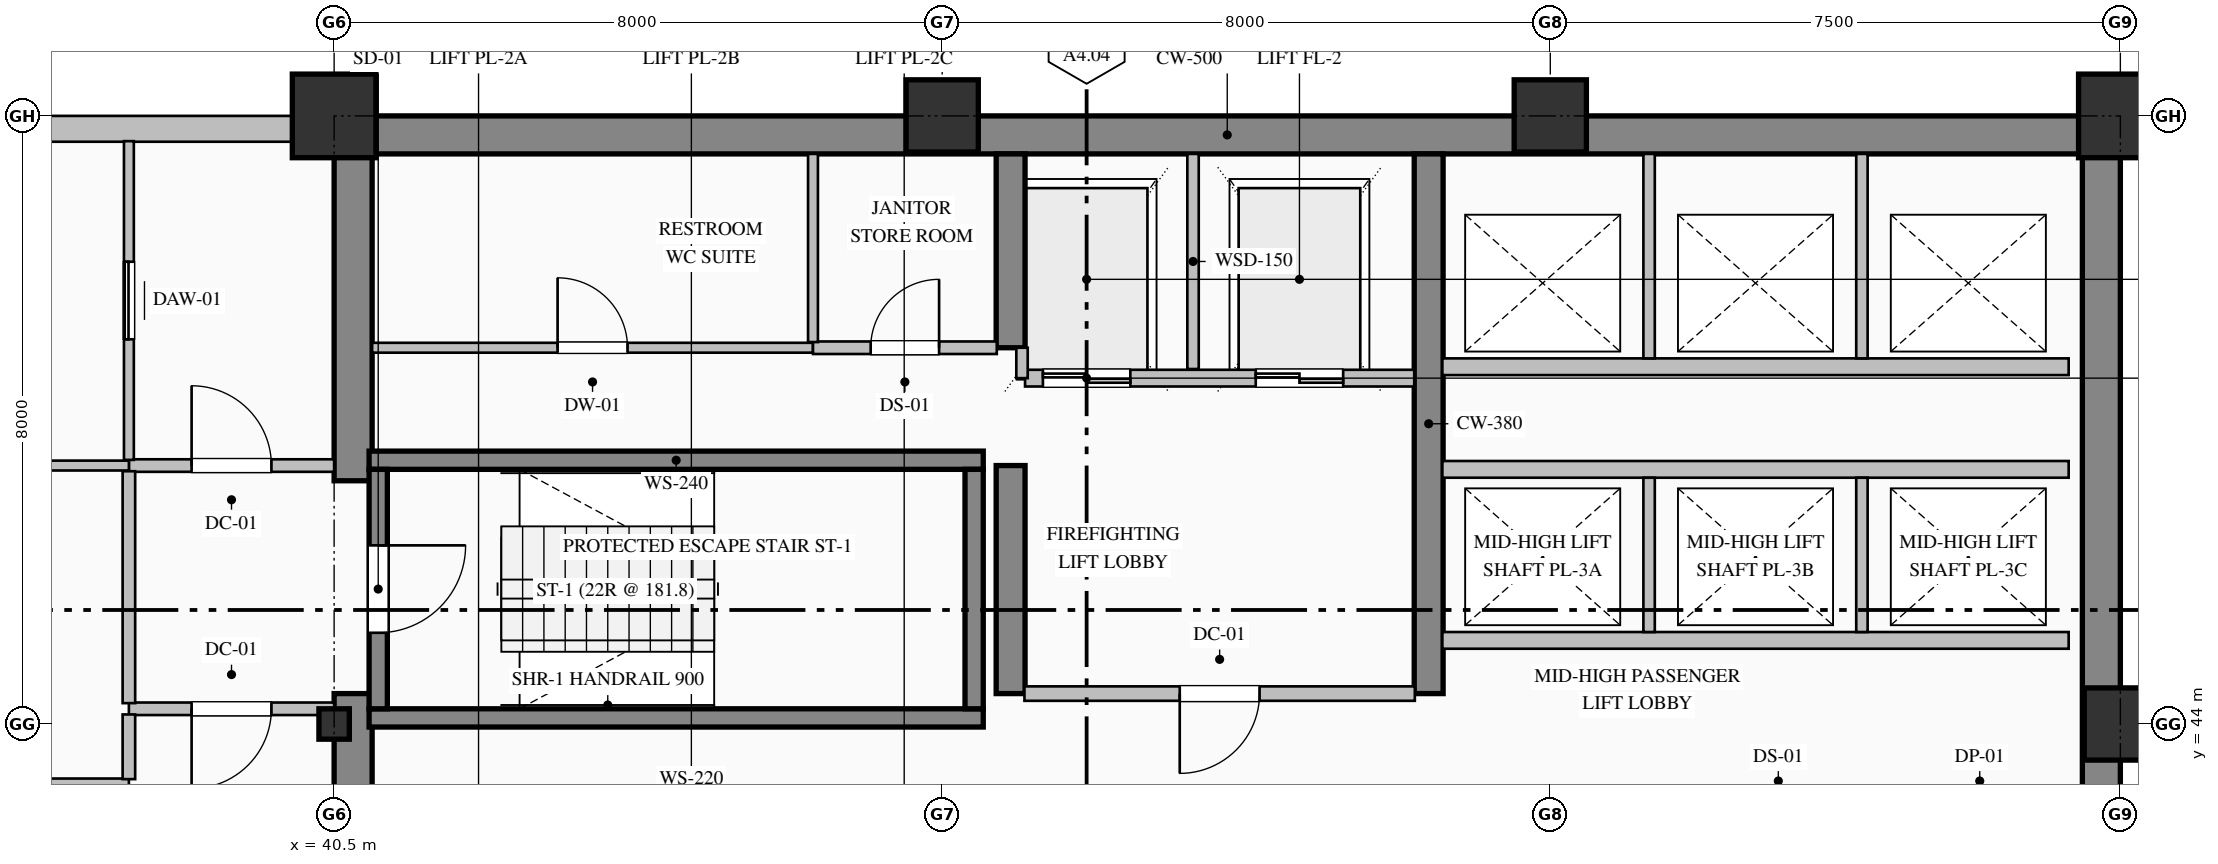
"""IFC4 building model, lengths in metres.
Left out: names, types, materials, properties, quantities, classifications, styles, units other than length and angle.
Written with IfcOpenShell. Run it as: python <this file> out.ifc"""

import sys

from ifc_helpers import new_model, si_unit, direction, frame, frame_2d, origin, origin_2d, place, context, subcontext, project, spatial, rectangle, hollow_rectangle, i_section, extrude, element, fill, save


model = new_model("IFC4")
c1 = context("Model", 3, precision=1e-05, world=origin(), true_north=direction((0.0, 1.0)))
c2 = subcontext(c1, "Body", "Model", "MODEL_VIEW")
j1 = project(units=[si_unit("LENGTHUNIT", "METRE"), si_unit("PLANEANGLEUNIT", "RADIAN")], contexts=[c1])
p1 = place(None, origin())
s1 = spatial("IfcSite", under=j1, at=p1, CompositionType="ELEMENT")
p2 = place(p1, origin())
s2 = spatial("IfcBuilding", under=s1, at=p2, CompositionType="ELEMENT")
p3 = place(p2, frame((0.0, 0.0, 191.0)))
s3 = spatial("IfcBuildingStorey", under=s2, at=p3, CompositionType="ELEMENT", Elevation=191.0)
p4 = place(p3, frame((40.5, 51.75, 0.0), z_axis=(0.0, 0.0, 1.0), x_axis=(1.0, 0.0, 0.0)))
e1 = element("IfcWall", 1, at=p4, inside=s3, PredefinedType="SHEAR", context=c2, shape_type="SweptSolid", body=[
    extrude(rectangle(XDim=23.5, YDim=0.5, at=frame_2d((11.75, 0.0))), origin(), (0.0, 0.0, 1.0), 3.65),
])
p5 = place(p3, frame((63.75, 36.32, 0.0), z_axis=(0.0, 0.0, 1.0), x_axis=(0.0, 1.0, 0.0)))
e2 = element("IfcWall", 2, at=p5, inside=s3, PredefinedType="SHEAR", context=c2, shape_type="SweptSolid", body=[
    extrude(rectangle(XDim=15.18, YDim=0.5, at=frame_2d((7.59, 0.0))), origin(), (0.0, 0.0, 1.0), 3.65),
])
p6 = place(p3, frame((40.75, 36.5, 0.0), z_axis=(0.0, 0.0, 1.0), x_axis=(0.0, 1.0, 0.0)))
e3 = element("IfcWall", 3, at=p6, inside=s3, PredefinedType="SHEAR", context=c2, shape_type="SweptSolid", body=[
    extrude(rectangle(XDim=7.9, YDim=0.5, at=frame_2d((3.95, 0.0))), origin(), (0.0, 0.0, 1.0), 3.65),
])
p7 = place(p3, frame((40.75, 47.2, 0.0), z_axis=(0.0, 0.0, 1.0), x_axis=(0.0, 1.0, 0.0)))
e4 = element("IfcWall", 4, at=p7, inside=s3, PredefinedType="SHEAR", context=c2, shape_type="SweptSolid", body=[
    extrude(rectangle(XDim=4.3, YDim=0.5, at=frame_2d((2.15, 0.0))), origin(), (0.0, 0.0, 1.0), 3.65),
])
p8 = place(p3, frame((49.4, 44.4, 0.0), z_axis=(0.0, 0.0, 1.0), x_axis=(0.0, 1.0, 0.0)))
e5 = element("IfcWall", 5, at=p8, inside=s3, PredefinedType="SHEAR", context=c2, shape_type="SweptSolid", body=[
    extrude(rectangle(XDim=3.0, YDim=0.38, at=frame_2d((1.5, 0.0))), origin(), (0.0, 0.0, 1.0), 3.65),
])
p9 = place(p3, frame((49.4, 48.95, 0.0), z_axis=(0.0, 0.0, 1.0), x_axis=(0.0, 1.0, 0.0)))
e6 = element("IfcWall", 6, at=p9, inside=s3, PredefinedType="SHEAR", context=c2, shape_type="SweptSolid", body=[
    extrude(rectangle(XDim=2.55, YDim=0.38, at=frame_2d((1.275, 0.0))), origin(), (0.0, 0.0, 1.0), 3.65),
])
p10 = place(p3, frame((54.9, 44.4, 0.0), z_axis=(0.0, 0.0, 1.0), x_axis=(0.0, 1.0, 0.0)))
e7 = element("IfcWall", 7, at=p10, inside=s3, PredefinedType="SHEAR", context=c2, shape_type="SweptSolid", body=[
    extrude(rectangle(XDim=7.1, YDim=0.38, at=frame_2d((3.55, 0.0))), origin(), (0.0, 0.0, 1.0), 3.65),
])
p11 = place(p3, frame((40.5, 44.0, 0.0), z_axis=(0.0, 0.0, 1.0), x_axis=(1.0, 0.0, 0.0)))
e8 = element("IfcColumn", 8, at=p11, inside=s3, PredefinedType="COLUMN", context=c2, shape_type="SweptSolid", body=[
    extrude(i_section(OverallWidth=0.4, OverallDepth=0.4, WebThickness=0.013, FlangeThickness=0.021, FilletRadius=0.022, at=origin_2d()), origin(), (0.0, 0.0, 1.0), 4.0),
])
p12 = place(p3, frame((40.5, 52.0, 0.0), z_axis=(0.0, 0.0, 1.0), x_axis=(1.0, 0.0, 0.0)))
e9 = element("IfcColumn", 9, at=p12, inside=s3, PredefinedType="COLUMN", context=c2, shape_type="SweptSolid", body=[
    extrude(hollow_rectangle(XDim=1.1, YDim=1.1, WallThickness=0.04, at=origin_2d()), origin(), (0.0, 0.0, 1.0), 4.0),
])
for number, where, z_axis, x_axis in (
    (10, (48.5, 52.0, 0.0), (0.0, 0.0, 1.0), (1.0, 0.0, 0.0)),
    (11, (56.5, 52.0, 0.0), (0.0, 0.0, 1.0), (1.0, 0.0, 0.0)),
    (12, (64.0, 44.0, 0.0), (0.0, 0.0, 1.0), (1.0, 0.0, 0.0)),
):
    element("IfcColumn", number, at=place(p3, frame(where, z_axis=z_axis, x_axis=x_axis)), inside=s3, PredefinedType="COLUMN", context=c2, shape_type="SweptSolid", body=[
        extrude(hollow_rectangle(XDim=0.95, YDim=0.95, WallThickness=0.036, at=origin_2d()), origin(), (0.0, 0.0, 1.0), 4.0),
    ])
p13 = place(p3, frame((64.0, 52.0, 0.0), z_axis=(0.0, 0.0, 1.0), x_axis=(1.0, 0.0, 0.0)))
e13 = element("IfcColumn", 13, at=p13, inside=s3, PredefinedType="COLUMN", context=c2, shape_type="SweptSolid", body=[
    extrude(hollow_rectangle(XDim=1.1, YDim=1.1, WallThickness=0.04, at=origin_2d()), origin(), (0.0, 0.0, 1.0), 4.0),
])
p14 = place(p3, frame((13.0, 51.83, 0.0), z_axis=(0.0, 0.0, 1.0), x_axis=(1.0, 0.0, 0.0)))
e14 = element("IfcWall", 14, at=p14, inside=s3, PredefinedType="SOLIDWALL", context=c2, shape_type="SweptSolid", body=[
    extrude(rectangle(XDim=27.52, YDim=0.34, at=frame_2d((13.76, 0.0))), origin(), (0.0, 0.0, 1.0), 3.15),
])
p15 = place(p14, frame((6.375, 0.0, 0.85)))
e15 = element("IfcOpeningElement", 15, at=p15, cuts=e14, PredefinedType="OPENING", context=c2, shape_type="SweptSolid", body=[
    extrude(rectangle(XDim=1.65, YDim=1.95, at=frame_2d((0.825, 0.975))), frame((0.0, 0.18, 0.0), z_axis=(0.0, -1.0, 0.0), x_axis=(1.0, 0.0, 0.0)), (0.0, 0.0, 1.0), 0.36),
])
p16 = place(p14, frame((13.65, 0.0, 0.85)))
e16 = element("IfcOpeningElement", 16, at=p16, cuts=e14, PredefinedType="OPENING", context=c2, shape_type="SweptSolid", body=[
    extrude(rectangle(XDim=1.5, YDim=1.95, at=frame_2d((0.75, 0.975))), frame((0.0, 0.18, 0.0), z_axis=(0.0, -1.0, 0.0), x_axis=(1.0, 0.0, 0.0)), (0.0, 0.0, 1.0), 0.36),
])
for number, where, z_axis, x_axis in (
    (17, (40.96, 47.47, 0.0), (0.0, 0.0, 1.0), (1.0, 0.0, 0.0)),
    (18, (49.04, 44.08, 0.0), (0.0, 0.0, 1.0), (-1.0, 0.0, 0.0)),
):
    element("IfcWall", number, at=place(p3, frame(where, z_axis=z_axis, x_axis=x_axis)), inside=s3, PredefinedType="SOLIDWALL", context=c2, shape_type="SweptSolid", body=[
        extrude(rectangle(XDim=8.08, YDim=0.24, at=frame_2d((4.04, 0.0))), origin(), (0.0, 0.0, 1.0), 4.0),
    ])
p17 = place(p3, frame((41.08, 47.35, 0.0), z_axis=(0.0, 0.0, 1.0), x_axis=(0.0, -1.0, 0.0)))
e19 = element("IfcWall", 19, at=p17, inside=s3, PredefinedType="SOLIDWALL", context=c2, shape_type="SweptSolid", body=[
    extrude(rectangle(XDim=3.15, YDim=0.24, at=frame_2d((1.575, 0.0))), origin(), (0.0, 0.0, 1.0), 4.0),
])
p18 = place(p17, frame((1.0, 0.0, 0.0)))
e20 = element("IfcOpeningElement", 20, at=p18, cuts=e19, PredefinedType="OPENING", context=c2, shape_type="SweptSolid", body=[
    extrude(rectangle(XDim=1.15, YDim=2.2, at=frame_2d((0.575, 1.1))), frame((0.0, 0.13, 0.0), z_axis=(0.0, -1.0, 0.0), x_axis=(1.0, 0.0, 0.0)), (0.0, 0.0, 1.0), 0.26),
])
p19 = place(p3, frame((48.92, 44.2, 0.0), z_axis=(0.0, 0.0, 1.0), x_axis=(0.0, 1.0, 0.0)))
e21 = element("IfcWall", 21, at=p19, inside=s3, PredefinedType="SOLIDWALL", context=c2, shape_type="SweptSolid", body=[
    extrude(rectangle(XDim=3.15, YDim=0.24, at=frame_2d((1.575, 0.0))), origin(), (0.0, 0.0, 1.0), 4.0),
])
p20 = place(p3, frame((54.71, 48.55, 0.0), z_axis=(0.0, 0.0, 1.0), x_axis=(-1.0, 0.0, 0.0)))
e22 = element("IfcWall", 22, at=p20, inside=s3, PredefinedType="PARTITIONING", context=c2, shape_type="SweptSolid", body=[
    extrude(rectangle(XDim=5.12, YDim=0.22, at=frame_2d((2.56, 0.0))), origin(), (0.0, 0.0, 1.0), 3.65),
])
p21 = place(p20, frame((3.735, 0.0, 0.0)))
e23 = element("IfcOpeningElement", 23, at=p21, cuts=e22, PredefinedType="OPENING", context=c2, shape_type="SweptSolid", body=[
    extrude(rectangle(XDim=1.15, YDim=2.2, at=frame_2d((0.575, 1.1))), frame((0.0, 0.12, 0.0), z_axis=(0.0, -1.0, 0.0), x_axis=(1.0, 0.0, 0.0)), (0.0, 0.0, 1.0), 0.24),
])
p22 = place(p20, frame((0.935, 0.0, 0.0)))
e24 = element("IfcOpeningElement", 24, at=p22, cuts=e22, PredefinedType="OPENING", context=c2, shape_type="SweptSolid", body=[
    extrude(rectangle(XDim=1.15, YDim=2.2, at=frame_2d((0.575, 1.1))), frame((0.0, 0.12, 0.0), z_axis=(0.0, -1.0, 0.0), x_axis=(1.0, 0.0, 0.0)), (0.0, 0.0, 1.0), 0.24),
])
p23 = place(p3, frame((51.8, 48.67, 0.0), z_axis=(0.0, 0.0, 1.0), x_axis=(0.0, 1.0, 0.0)))
e25 = element("IfcWall", 25, at=p23, inside=s3, PredefinedType="PARTITIONING", context=c2, shape_type="SweptSolid", body=[
    extrude(rectangle(XDim=2.83, YDim=0.15, at=frame_2d((1.415, 0.0))), origin(), (0.0, 0.0, 1.0), 3.65),
])
p24 = place(p3, frame((49.55, 48.55, 0.0), z_axis=(0.0, 0.0, 1.0), x_axis=(0.0, 1.0, 0.0)))
e26 = element("IfcWall", 26, at=p24, inside=s3, PredefinedType="PARTITIONING", context=c2, shape_type="SweptSolid", body=[
    extrude(rectangle(XDim=0.4, YDim=0.15, at=frame_2d((0.2, 0.0))), origin(), (0.0, 0.0, 1.0), 3.65),
])
for number, where, z_axis, x_axis in (
    (27, (63.32, 45.1, 0.0), (0.0, 0.0, 1.0), (-1.0, 0.0, 0.0)),
    (28, (55.08, 47.35, 0.0), (0.0, 0.0, 1.0), (1.0, 0.0, 0.0)),
):
    element("IfcWall", number, at=place(p3, frame(where, z_axis=z_axis, x_axis=x_axis)), inside=s3, PredefinedType="PARTITIONING", context=c2, shape_type="SweptSolid", body=[
        extrude(rectangle(XDim=8.24, YDim=0.22, at=frame_2d((4.12, 0.0))), origin(), (0.0, 0.0, 1.0), 3.65),
    ])
for number, where, z_axis, x_axis in (
    (29, (57.8, 45.21, 0.0), (0.0, 0.0, 1.0), (0.0, 1.0, 0.0)),
    (30, (60.6, 45.21, 0.0), (0.0, 0.0, 1.0), (0.0, 1.0, 0.0)),
):
    element("IfcWall", number, at=place(p3, frame(where, z_axis=z_axis, x_axis=x_axis)), inside=s3, PredefinedType="PARTITIONING", context=c2, shape_type="SweptSolid", body=[
        extrude(rectangle(XDim=2.03, YDim=0.15, at=frame_2d((1.015, 0.0))), origin(), (0.0, 0.0, 1.0), 3.65),
    ])
p25 = place(p3, frame((63.32, 48.7, 0.0), z_axis=(0.0, 0.0, 1.0), x_axis=(-1.0, 0.0, 0.0)))
e31 = element("IfcWall", 31, at=p25, inside=s3, PredefinedType="PARTITIONING", context=c2, shape_type="SweptSolid", body=[
    extrude(rectangle(XDim=8.24, YDim=0.22, at=frame_2d((4.12, 0.0))), origin(), (0.0, 0.0, 1.0), 3.65),
])
for number, where, z_axis, x_axis in (
    (32, (57.8, 48.81, 0.0), (0.0, 0.0, 1.0), (0.0, 1.0, 0.0)),
    (33, (60.6, 48.81, 0.0), (0.0, 0.0, 1.0), (0.0, 1.0, 0.0)),
):
    element("IfcWall", number, at=place(p3, frame(where, z_axis=z_axis, x_axis=x_axis)), inside=s3, PredefinedType="PARTITIONING", context=c2, shape_type="SweptSolid", body=[
        extrude(rectangle(XDim=2.69, YDim=0.15, at=frame_2d((1.345, 0.0))), origin(), (0.0, 0.0, 1.0), 3.65),
    ])
p26 = place(p3, frame((37.8, 47.4, 0.0), z_axis=(0.0, 0.0, 1.0), x_axis=(1.0, 0.0, 0.0)))
e34 = element("IfcWall", 34, at=p26, inside=s3, PredefinedType="PARTITIONING", context=c2, shape_type="SweptSolid", body=[
    extrude(rectangle(XDim=2.7, YDim=0.165, at=frame_2d((1.35, 0.0))), origin(), (0.0, 0.0, 1.0), 3.65),
])
p27 = place(p26, frame((0.825, 0.0, 0.0)))
e35 = element("IfcOpeningElement", 35, at=p27, cuts=e34, PredefinedType="OPENING", context=c2, shape_type="SweptSolid", body=[
    extrude(rectangle(XDim=1.05, YDim=2.15, at=frame_2d((0.525, 1.075))), frame((0.0, 0.093, 0.0), z_axis=(0.0, -1.0, 0.0), x_axis=(1.0, 0.0, 0.0)), (0.0, 0.0, 1.0), 0.185),
])
p28 = place(p3, frame((40.5, 44.2, 0.0), z_axis=(0.0, 0.0, 1.0), x_axis=(-1.0, 0.0, 0.0)))
e36 = element("IfcWall", 36, at=p28, inside=s3, PredefinedType="PARTITIONING", context=c2, shape_type="SweptSolid", body=[
    extrude(rectangle(XDim=2.7, YDim=0.165, at=frame_2d((1.35, 0.0))), origin(), (0.0, 0.0, 1.0), 3.65),
])
p29 = place(p28, frame((0.825, 0.0, 0.0)))
e37 = element("IfcOpeningElement", 37, at=p29, cuts=e36, PredefinedType="OPENING", context=c2, shape_type="SweptSolid", body=[
    extrude(rectangle(XDim=1.05, YDim=2.15, at=frame_2d((0.525, 1.075))), frame((0.0, 0.093, 0.0), z_axis=(0.0, -1.0, 0.0), x_axis=(1.0, 0.0, 0.0)), (0.0, 0.0, 1.0), 0.185),
])
p30 = place(p3, frame((37.8, 44.274, 0.0), z_axis=(0.0, 0.0, 1.0), x_axis=(0.0, 1.0, 0.0)))
e38 = element("IfcWall", 38, at=p30, inside=s3, PredefinedType="PARTITIONING", context=c2, shape_type="SweptSolid", body=[
    extrude(rectangle(XDim=3.051, YDim=0.165, at=frame_2d((1.525, 0.0))), origin(), (0.0, 0.0, 1.0), 3.65),
])
p31 = place(p3, frame((37.8, 47.475, 0.0), z_axis=(0.0, 0.0, 1.0), x_axis=(0.0, 1.0, 0.0)))
e39 = element("IfcWall", 39, at=p31, inside=s3, PredefinedType="PARTITIONING", context=c2, shape_type="SweptSolid", body=[
    extrude(rectangle(XDim=4.193, YDim=0.13, at=frame_2d((2.097, 0.0))), origin(), (0.0, 0.0, 1.0), 3.65),
])
p32 = place(p31, frame((1.587, 0.0, 0.0)))
e40 = element("IfcOpeningElement", 40, at=p32, cuts=e39, PredefinedType="OPENING", context=c2, shape_type="SweptSolid", body=[
    extrude(rectangle(XDim=1.02, YDim=2.15, at=frame_2d((0.51, 1.075))), frame((0.0, 0.075, 0.0), z_axis=(0.0, -1.0, 0.0), x_axis=(1.0, 0.0, 0.0)), (0.0, 0.0, 1.0), 0.15),
])
p33 = place(p3, frame((37.8, 47.4, 0.0), z_axis=(0.0, 0.0, 1.0), x_axis=(-1.0, 0.0, 0.0)))
e41 = element("IfcWall", 41, at=p33, inside=s3, PredefinedType="PARTITIONING", context=c2, shape_type="SweptSolid", body=[
    extrude(rectangle(XDim=2.4, YDim=0.13, at=frame_2d((1.2, 0.0))), origin(), (0.0, 0.0, 1.0), 3.65),
])
p34 = place(p3, frame((41.0, 48.95, 0.0), z_axis=(0.0, 0.0, 1.0), x_axis=(1.0, 0.0, 0.0)))
e42 = element("IfcWall", 42, at=p34, inside=s3, PredefinedType="PARTITIONING", context=c2, shape_type="SweptSolid", body=[
    extrude(rectangle(XDim=5.8, YDim=0.13, at=frame_2d((2.9, 0.0))), origin(), (0.0, 0.0, 1.0), 3.65),
])
p35 = place(p34, frame((2.44, 0.0, 0.0)))
e43 = element("IfcOpeningElement", 43, at=p35, cuts=e42, PredefinedType="OPENING", context=c2, shape_type="SweptSolid", body=[
    extrude(rectangle(XDim=0.92, YDim=2.15, at=frame_2d((0.46, 1.075))), frame((0.0, 0.075, 0.0), z_axis=(0.0, -1.0, 0.0), x_axis=(1.0, 0.0, 0.0)), (0.0, 0.0, 1.0), 0.15),
])
p36 = place(p3, frame((46.8, 48.95, 0.0), z_axis=(0.0, 0.0, 1.0), x_axis=(1.0, 0.0, 0.0)))
e44 = element("IfcWall", 44, at=p36, inside=s3, PredefinedType="PARTITIONING", context=c2, shape_type="SweptSolid", body=[
    extrude(rectangle(XDim=2.418, YDim=0.165, at=frame_2d((1.209, 0.0))), origin(), (0.0, 0.0, 1.0), 3.65),
])
p37 = place(p36, frame((0.759, 0.0, 0.0)))
e45 = element("IfcOpeningElement", 45, at=p37, cuts=e44, PredefinedType="OPENING", context=c2, shape_type="SweptSolid", body=[
    extrude(rectangle(XDim=0.9, YDim=2.15, at=frame_2d((0.45, 1.075))), frame((0.0, 0.093, 0.0), z_axis=(0.0, -1.0, 0.0), x_axis=(1.0, 0.0, 0.0)), (0.0, 0.0, 1.0), 0.185),
])
p38 = place(p3, frame((54.718, 44.4, 0.0), z_axis=(0.0, 0.0, 1.0), x_axis=(-1.0, 0.0, 0.0)))
e46 = element("IfcWall", 46, at=p38, inside=s3, PredefinedType="PARTITIONING", context=c2, shape_type="SweptSolid", body=[
    extrude(rectangle(XDim=5.136, YDim=0.19, at=frame_2d((2.568, 0.0))), origin(), (0.0, 0.0, 1.0), 3.65),
])
p39 = place(p38, frame((2.043, 0.0, 0.0)))
e47 = element("IfcOpeningElement", 47, at=p39, cuts=e46, PredefinedType="OPENING", context=c2, shape_type="SweptSolid", body=[
    extrude(rectangle(XDim=1.05, YDim=2.15, at=frame_2d((0.525, 1.075))), frame((0.0, 0.105, 0.0), z_axis=(0.0, -1.0, 0.0), x_axis=(1.0, 0.0, 0.0)), (0.0, 0.0, 1.0), 0.21),
])
p40 = place(p3, frame((46.8, 51.5, 0.0), z_axis=(0.0, 0.0, 1.0), x_axis=(0.0, -1.0, 0.0)))
e48 = element("IfcWall", 48, at=p40, inside=s3, PredefinedType="PARTITIONING", context=c2, shape_type="SweptSolid", body=[
    extrude(rectangle(XDim=2.476, YDim=0.13, at=frame_2d((1.238, 0.0))), origin(), (0.0, 0.0, 1.0), 3.65),
])
p41 = place(p3, frame((30.6, 43.2, 0.0), z_axis=(0.0, 0.0, 1.0), x_axis=(1.0, 0.0, 0.0)))
e49 = element("IfcWall", 49, at=p41, inside=s3, PredefinedType="PARTITIONING", context=c2, shape_type="SweptSolid", body=[
    extrude(rectangle(XDim=7.2, YDim=0.165, at=frame_2d((3.6, 0.0))), origin(), (0.0, 0.0, 1.0), 3.65),
])
p42 = place(p41, frame((3.05, 0.0, 0.0)))
e50 = element("IfcOpeningElement", 50, at=p42, cuts=e49, PredefinedType="OPENING", context=c2, shape_type="SweptSolid", body=[
    extrude(rectangle(XDim=1.1, YDim=2.2, at=frame_2d((0.55, 1.1))), frame((0.0, 0.093, 0.0), z_axis=(0.0, -1.0, 0.0), x_axis=(1.0, 0.0, 0.0)), (0.0, 0.0, 1.0), 0.185),
])
p43 = place(p3, frame((37.8, 43.274, 0.0), z_axis=(0.0, 0.0, 1.0), x_axis=(0.0, 1.0, 0.0)))
e51 = element("IfcWall", 51, at=p43, inside=s3, PredefinedType="PARTITIONING", context=c2, shape_type="SweptSolid", body=[
    extrude(rectangle(XDim=0.851, YDim=0.165, at=frame_2d((0.426, 0.0))), origin(), (0.0, 0.0, 1.0), 3.65),
])
p44 = place(p18, origin())
e52 = element("IfcDoor", 52, at=p44, inside=s3, OperationType="SINGLE_SWING_LEFT", PredefinedType="DOOR", context=c2, shape_type="SweptSolid", body=[
    extrude(rectangle(XDim=1.15, YDim=2.2, at=frame_2d((0.575, 1.1))), frame((0.0, 0.025, 0.0), z_axis=(0.0, -1.0, 0.0), x_axis=(1.0, 0.0, 0.0)), (0.0, 0.0, 1.0), 0.05),
])
fill(e20, e52)
p45 = place(p21, origin())
e53 = element("IfcDoor", 53, at=p45, inside=s3, OperationType="DOUBLE_DOOR_SLIDING", PredefinedType="DOOR", context=c2, shape_type="SweptSolid", body=[
    extrude(rectangle(XDim=1.15, YDim=2.2, at=frame_2d((0.575, 1.1))), frame((0.0, 0.025, 0.0), z_axis=(0.0, -1.0, 0.0), x_axis=(1.0, 0.0, 0.0)), (0.0, 0.0, 1.0), 0.05),
])
fill(e23, e53)
p46 = place(p22, origin())
e54 = element("IfcDoor", 54, at=p46, inside=s3, OperationType="DOUBLE_DOOR_SLIDING", PredefinedType="DOOR", context=c2, shape_type="SweptSolid", body=[
    extrude(rectangle(XDim=1.15, YDim=2.2, at=frame_2d((0.575, 1.1))), frame((0.0, 0.025, 0.0), z_axis=(0.0, -1.0, 0.0), x_axis=(1.0, 0.0, 0.0)), (0.0, 0.0, 1.0), 0.05),
])
fill(e24, e54)
p47 = place(p39, origin())
e55 = element("IfcDoor", 55, at=p47, inside=s3, OperationType="SINGLE_SWING_RIGHT", PredefinedType="DOOR", context=c2, shape_type="SweptSolid", body=[
    extrude(rectangle(XDim=1.05, YDim=2.15, at=frame_2d((0.525, 1.075))), frame((0.0, 0.025, 0.0), z_axis=(0.0, -1.0, 0.0), x_axis=(1.0, 0.0, 0.0)), (0.0, 0.0, 1.0), 0.05),
])
fill(e47, e55)
p48 = place(p27, origin())
e56 = element("IfcDoor", 56, at=p48, inside=s3, OperationType="SINGLE_SWING_LEFT", PredefinedType="DOOR", context=c2, shape_type="SweptSolid", body=[
    extrude(rectangle(XDim=1.05, YDim=2.15, at=frame_2d((0.525, 1.075))), frame((0.0, 0.025, 0.0), z_axis=(0.0, -1.0, 0.0), x_axis=(1.0, 0.0, 0.0)), (0.0, 0.0, 1.0), 0.05),
])
fill(e35, e56)
p49 = place(p29, origin())
e57 = element("IfcDoor", 57, at=p49, inside=s3, OperationType="SINGLE_SWING_RIGHT", PredefinedType="DOOR", context=c2, shape_type="SweptSolid", body=[
    extrude(rectangle(XDim=1.05, YDim=2.15, at=frame_2d((0.525, 1.075))), frame((0.0, 0.025, 0.0), z_axis=(0.0, -1.0, 0.0), x_axis=(1.0, 0.0, 0.0)), (0.0, 0.0, 1.0), 0.05),
])
fill(e37, e57)
p50 = place(p32, origin())
e58 = element("IfcDoor", 58, at=p50, inside=s3, OperationType="SLIDING_TO_LEFT", PredefinedType="DOOR", context=c2, shape_type="SweptSolid", body=[
    extrude(rectangle(XDim=1.02, YDim=2.15, at=frame_2d((0.51, 1.075))), frame((0.0, 0.025, 0.0), z_axis=(0.0, -1.0, 0.0), x_axis=(1.0, 0.0, 0.0)), (0.0, 0.0, 1.0), 0.05),
])
fill(e40, e58)
p51 = place(p35, origin())
e59 = element("IfcDoor", 59, at=p51, inside=s3, OperationType="SINGLE_SWING_LEFT", PredefinedType="DOOR", context=c2, shape_type="SweptSolid", body=[
    extrude(rectangle(XDim=0.92, YDim=2.15, at=frame_2d((0.46, 1.075))), frame((0.0, 0.025, 0.0), z_axis=(0.0, -1.0, 0.0), x_axis=(1.0, 0.0, 0.0)), (0.0, 0.0, 1.0), 0.05),
])
fill(e43, e59)
p52 = place(p37, origin())
e60 = element("IfcDoor", 60, at=p52, inside=s3, OperationType="SINGLE_SWING_RIGHT", PredefinedType="DOOR", context=c2, shape_type="SweptSolid", body=[
    extrude(rectangle(XDim=0.9, YDim=2.15, at=frame_2d((0.45, 1.075))), frame((0.0, 0.025, 0.0), z_axis=(0.0, -1.0, 0.0), x_axis=(1.0, 0.0, 0.0)), (0.0, 0.0, 1.0), 0.05),
])
fill(e45, e60)
save(model, sys.argv[1])
